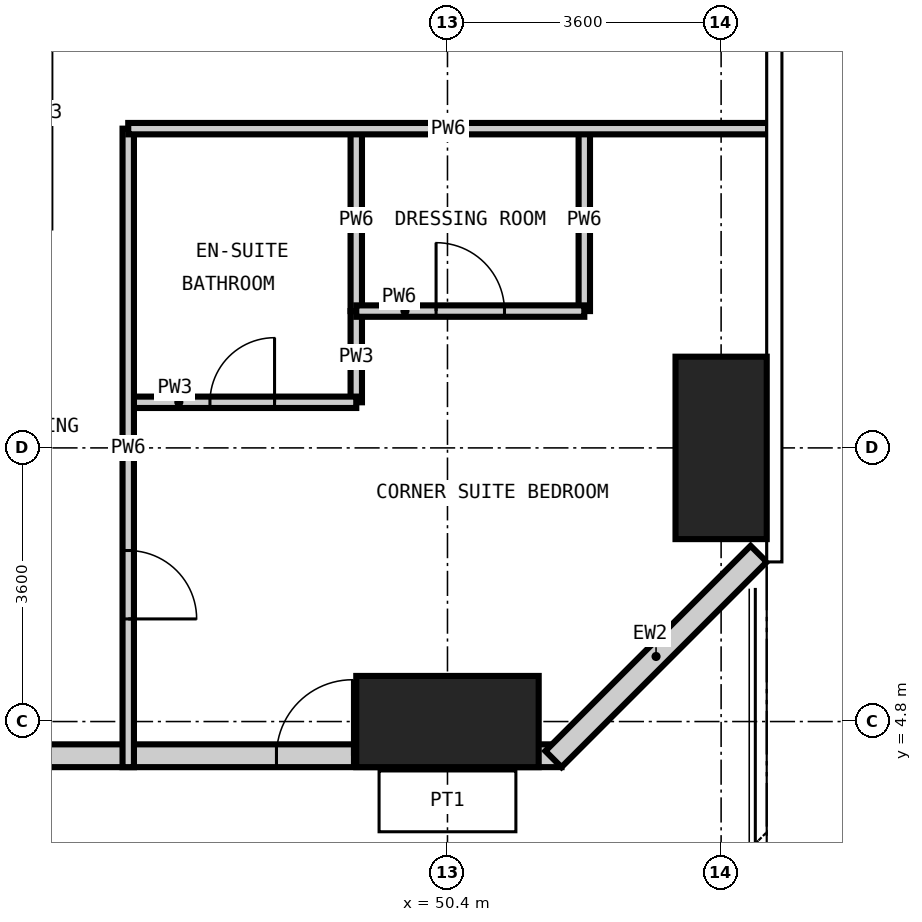
"""IFC4 building model, lengths in metres.
Left out: names, types, materials, properties, quantities, classifications, styles, units other than length and angle.
Written with IfcOpenShell. Run it as: python <this file> out.ifc"""

import sys

from ifc_helpers import new_model, si_unit, direction, frame, frame_2d, origin, origin_2d, place, context, subcontext, project, spatial, rectangle, extrude, element, fill, save


model = new_model("IFC4")
c1 = context("Model", 3, precision=1e-05, world=origin(), true_north=direction((0.0, 1.0)))
c2 = subcontext(c1, "Body", "Model", "MODEL_VIEW")
j1 = project(units=[si_unit("LENGTHUNIT", "METRE"), si_unit("PLANEANGLEUNIT", "RADIAN")], contexts=[c1])
p1 = place(None, origin())
s1 = spatial("IfcSite", under=j1, at=p1, CompositionType="ELEMENT")
p2 = place(p1, origin())
s2 = spatial("IfcBuilding", under=s1, at=p2, CompositionType="ELEMENT")
p3 = place(p2, frame((0.0, 0.0, 159.0)))
s3 = spatial("IfcBuildingStorey", under=s2, at=p3, CompositionType="ELEMENT", Elevation=159.0)
p4 = place(p3, frame((50.4, 4.8, -0.35), z_axis=(0.0, 0.0, 1.0), x_axis=(1.0, 0.0, 0.0)))
e1 = element("IfcColumn", 1, at=p4, inside=s3, PredefinedType="COLUMN", context=c2, shape_type="SweptSolid", body=[
    extrude(rectangle(XDim=2.4, YDim=1.2, at=origin_2d()), origin(), (0.0, 0.0, 1.0), 3.6),
])
p5 = place(p3, frame((54.0, 8.4, -0.35), z_axis=(0.0, 0.0, 1.0), x_axis=(1.0, 0.0, 0.0)))
e2 = element("IfcColumn", 2, at=p5, inside=s3, PredefinedType="COLUMN", context=c2, shape_type="SweptSolid", body=[
    extrude(rectangle(XDim=1.2, YDim=2.4, at=origin_2d()), origin(), (0.0, 0.0, 1.0), 3.6),
])
p6 = place(p3, frame((6.9, 4.35, 0.0), z_axis=(0.0, 0.0, 1.0), x_axis=(1.0, 0.0, 0.0)))
e3 = element("IfcWall", 3, at=p6, inside=s3, PredefinedType="SOLIDWALL", context=c2, shape_type="SweptSolid", body=[
    extrude(rectangle(XDim=45.0, YDim=0.3, at=frame_2d((22.5, 0.0))), origin(), (0.0, 0.0, 1.0), 3.25),
])
p7 = place(p6, frame((2.75, 0.0, 0.0)))
e4 = element("IfcOpeningElement", 4, at=p7, cuts=e3, PredefinedType="OPENING", context=c2, shape_type="SweptSolid", body=[
    extrude(rectangle(XDim=1.0, YDim=2.4, at=frame_2d((0.5, 1.2))), frame((0.0, 0.16, 0.0), z_axis=(0.0, -1.0, 0.0), x_axis=(1.0, 0.0, 0.0)), (0.0, 0.0, 1.0), 0.32),
])
p8 = place(p6, frame((7.3, 0.0, 0.0)))
e5 = element("IfcOpeningElement", 5, at=p8, cuts=e3, PredefinedType="OPENING", context=c2, shape_type="SweptSolid", body=[
    extrude(rectangle(XDim=1.0, YDim=2.4, at=frame_2d((0.5, 1.2))), frame((0.0, 0.16, 0.0), z_axis=(0.0, -1.0, 0.0), x_axis=(1.0, 0.0, 0.0)), (0.0, 0.0, 1.0), 0.32),
])
p9 = place(p6, frame((11.5, 0.0, 0.0)))
e6 = element("IfcOpeningElement", 6, at=p9, cuts=e3, PredefinedType="OPENING", context=c2, shape_type="SweptSolid", body=[
    extrude(rectangle(XDim=1.0, YDim=2.4, at=frame_2d((0.5, 1.2))), frame((0.0, 0.16, 0.0), z_axis=(0.0, -1.0, 0.0), x_axis=(1.0, 0.0, 0.0)), (0.0, 0.0, 1.0), 0.32),
])
p10 = place(p6, frame((15.7, 0.0, 0.0)))
e7 = element("IfcOpeningElement", 7, at=p10, cuts=e3, PredefinedType="OPENING", context=c2, shape_type="SweptSolid", body=[
    extrude(rectangle(XDim=1.0, YDim=2.4, at=frame_2d((0.5, 1.2))), frame((0.0, 0.16, 0.0), z_axis=(0.0, -1.0, 0.0), x_axis=(1.0, 0.0, 0.0)), (0.0, 0.0, 1.0), 0.32),
])
p11 = place(p6, frame((19.9, 0.0, 0.0)))
e8 = element("IfcOpeningElement", 8, at=p11, cuts=e3, PredefinedType="OPENING", context=c2, shape_type="SweptSolid", body=[
    extrude(rectangle(XDim=1.0, YDim=2.4, at=frame_2d((0.5, 1.2))), frame((0.0, 0.16, 0.0), z_axis=(0.0, -1.0, 0.0), x_axis=(1.0, 0.0, 0.0)), (0.0, 0.0, 1.0), 0.32),
])
p12 = place(p6, frame((24.1, 0.0, 0.0)))
e9 = element("IfcOpeningElement", 9, at=p12, cuts=e3, PredefinedType="OPENING", context=c2, shape_type="SweptSolid", body=[
    extrude(rectangle(XDim=1.0, YDim=2.4, at=frame_2d((0.5, 1.2))), frame((0.0, 0.16, 0.0), z_axis=(0.0, -1.0, 0.0), x_axis=(1.0, 0.0, 0.0)), (0.0, 0.0, 1.0), 0.32),
])
p13 = place(p6, frame((28.3, 0.0, 0.0)))
e10 = element("IfcOpeningElement", 10, at=p13, cuts=e3, PredefinedType="OPENING", context=c2, shape_type="SweptSolid", body=[
    extrude(rectangle(XDim=1.0, YDim=2.4, at=frame_2d((0.5, 1.2))), frame((0.0, 0.16, 0.0), z_axis=(0.0, -1.0, 0.0), x_axis=(1.0, 0.0, 0.0)), (0.0, 0.0, 1.0), 0.32),
])
p14 = place(p6, frame((32.5, 0.0, 0.0)))
e11 = element("IfcOpeningElement", 11, at=p14, cuts=e3, PredefinedType="OPENING", context=c2, shape_type="SweptSolid", body=[
    extrude(rectangle(XDim=1.0, YDim=2.4, at=frame_2d((0.5, 1.2))), frame((0.0, 0.16, 0.0), z_axis=(0.0, -1.0, 0.0), x_axis=(1.0, 0.0, 0.0)), (0.0, 0.0, 1.0), 0.32),
])
p15 = place(p6, frame((36.7, 0.0, 0.0)))
e12 = element("IfcOpeningElement", 12, at=p15, cuts=e3, PredefinedType="OPENING", context=c2, shape_type="SweptSolid", body=[
    extrude(rectangle(XDim=1.0, YDim=2.4, at=frame_2d((0.5, 1.2))), frame((0.0, 0.16, 0.0), z_axis=(0.0, -1.0, 0.0), x_axis=(1.0, 0.0, 0.0)), (0.0, 0.0, 1.0), 0.32),
])
p16 = place(p6, frame((41.25, 0.0, 0.0)))
e13 = element("IfcOpeningElement", 13, at=p16, cuts=e3, PredefinedType="OPENING", context=c2, shape_type="SweptSolid", body=[
    extrude(rectangle(XDim=1.0, YDim=2.4, at=frame_2d((0.5, 1.2))), frame((0.0, 0.16, 0.0), z_axis=(0.0, -1.0, 0.0), x_axis=(1.0, 0.0, 0.0)), (0.0, 0.0, 1.0), 0.32),
])
p17 = place(p3, frame((51.794, 4.306, 0.0), z_axis=(0.0, 0.0, 1.0), x_axis=(0.707074812166, 0.707138748762, 0.0)))
e14 = element("IfcWall", 14, at=p17, inside=s3, PredefinedType="SOLIDWALL", context=c2, shape_type="SweptSolid", body=[
    extrude(rectangle(XDim=3.818, YDim=0.3, at=frame_2d((1.909, 0.0))), origin(), (0.0, 0.0, 1.0), 3.25),
])
p18 = place(p3, frame((49.2, 9.0, 0.0), z_axis=(0.0, 0.0, 1.0), x_axis=(0.0, 1.0, 0.0)))
e15 = element("IfcWall", 15, at=p18, inside=s3, PredefinedType="PARTITIONING", context=c2, shape_type="SweptSolid", body=[
    extrude(rectangle(XDim=1.2, YDim=0.15, at=frame_2d((0.6, 0.0))), origin(), (0.0, 0.0, 1.0), 3.25),
])
p19 = place(p3, frame((46.2, 9.0, 0.0), z_axis=(0.0, 0.0, 1.0), x_axis=(1.0, 0.0, 0.0)))
e16 = element("IfcWall", 16, at=p19, inside=s3, PredefinedType="PARTITIONING", context=c2, shape_type="SweptSolid", body=[
    extrude(rectangle(XDim=3.0, YDim=0.15, at=frame_2d((1.5, 0.0))), origin(), (0.0, 0.0, 1.0), 3.25),
])
p20 = place(p19, frame((1.075, 0.0, 0.0)))
e17 = element("IfcOpeningElement", 17, at=p20, cuts=e16, PredefinedType="OPENING", context=c2, shape_type="SweptSolid", body=[
    extrude(rectangle(XDim=0.85, YDim=2.1, at=frame_2d((0.425, 1.05))), frame((0.0, 0.085, 0.0), z_axis=(0.0, -1.0, 0.0), x_axis=(1.0, 0.0, 0.0)), (0.0, 0.0, 1.0), 0.17),
])
p21 = place(p3, frame((46.2, 4.2, 0.0), z_axis=(0.0, 0.0, 1.0), x_axis=(0.0, 1.0, 0.0)))
e18 = element("IfcWall", 18, at=p21, inside=s3, PredefinedType="PARTITIONING", context=c2, shape_type="SweptSolid", body=[
    extrude(rectangle(XDim=8.4, YDim=0.15, at=frame_2d((4.2, 0.0))), origin(), (0.0, 0.0, 1.0), 3.25),
])
p22 = place(p21, frame((1.95, 0.0, 0.0)))
e19 = element("IfcOpeningElement", 19, at=p22, cuts=e18, PredefinedType="OPENING", context=c2, shape_type="SweptSolid", body=[
    extrude(rectangle(XDim=0.9, YDim=2.1, at=frame_2d((0.45, 1.05))), frame((0.0, 0.085, 0.0), z_axis=(0.0, -1.0, 0.0), x_axis=(1.0, 0.0, 0.0)), (0.0, 0.0, 1.0), 0.17),
])
for number, where, z_axis, x_axis in (
    (20, (49.2, 10.2, 0.0), (0.0, 0.0, 1.0), (0.0, 1.0, 0.0)),
    (21, (52.2, 10.2, 0.0), (0.0, 0.0, 1.0), (0.0, 1.0, 0.0)),
):
    element("IfcWall", number, at=place(p3, frame(where, z_axis=z_axis, x_axis=x_axis)), inside=s3, PredefinedType="PARTITIONING", context=c2, shape_type="SweptSolid", body=[
        extrude(rectangle(XDim=2.4, YDim=0.15, at=frame_2d((1.2, 0.0))), origin(), (0.0, 0.0, 1.0), 3.25),
    ])
p23 = place(p3, frame((49.2, 10.2, 0.0), z_axis=(0.0, 0.0, 1.0), x_axis=(1.0, 0.0, 0.0)))
e22 = element("IfcWall", 22, at=p23, inside=s3, PredefinedType="PARTITIONING", context=c2, shape_type="SweptSolid", body=[
    extrude(rectangle(XDim=3.0, YDim=0.15, at=frame_2d((1.5, 0.0))), origin(), (0.0, 0.0, 1.0), 3.25),
])
p24 = place(p23, frame((1.05, 0.0, 0.0)))
e23 = element("IfcOpeningElement", 23, at=p24, cuts=e22, PredefinedType="OPENING", context=c2, shape_type="SweptSolid", body=[
    extrude(rectangle(XDim=0.9, YDim=2.1, at=frame_2d((0.45, 1.05))), frame((0.0, 0.085, 0.0), z_axis=(0.0, -1.0, 0.0), x_axis=(1.0, 0.0, 0.0)), (0.0, 0.0, 1.0), 0.17),
])
p25 = place(p3, frame((46.2, 12.6, 0.0), z_axis=(0.0, 0.0, 1.0), x_axis=(1.0, 0.0, 0.0)))
e24 = element("IfcWall", 24, at=p25, inside=s3, PredefinedType="PARTITIONING", context=c2, shape_type="SweptSolid", body=[
    extrude(rectangle(XDim=8.418, YDim=0.15, at=frame_2d((4.209, 0.0))), origin(), (0.0, 0.0, 1.0), 3.25),
])
p26 = place(p16, origin())
e25 = element("IfcDoor", 25, at=p26, inside=s3, OperationType="SINGLE_SWING_RIGHT", PredefinedType="DOOR", context=c2, shape_type="SweptSolid", body=[
    extrude(rectangle(XDim=1.0, YDim=2.4, at=frame_2d((0.5, 1.2))), frame((0.0, 0.025, 0.0), z_axis=(0.0, -1.0, 0.0), x_axis=(1.0, 0.0, 0.0)), (0.0, 0.0, 1.0), 0.05),
])
fill(e13, e25)
p27 = place(p22, frame((0.9, 0.0, 0.0), z_axis=(0.0, 0.0, 1.0), x_axis=(-1.0, 0.0, 0.0)))
e26 = element("IfcDoor", 26, at=p27, inside=s3, OperationType="SINGLE_SWING_RIGHT", PredefinedType="DOOR", context=c2, shape_type="SweptSolid", body=[
    extrude(rectangle(XDim=0.9, YDim=2.1, at=frame_2d((0.45, 1.05))), frame((0.0, 0.025, 0.0), z_axis=(0.0, -1.0, 0.0), x_axis=(1.0, 0.0, 0.0)), (0.0, 0.0, 1.0), 0.05),
])
fill(e19, e26)
p28 = place(p20, origin())
e27 = element("IfcDoor", 27, at=p28, inside=s3, OperationType="SINGLE_SWING_RIGHT", PredefinedType="DOOR", context=c2, shape_type="SweptSolid", body=[
    extrude(rectangle(XDim=0.85, YDim=2.1, at=frame_2d((0.425, 1.05))), frame((0.0, 0.025, 0.0), z_axis=(0.0, -1.0, 0.0), x_axis=(1.0, 0.0, 0.0)), (0.0, 0.0, 1.0), 0.05),
])
fill(e17, e27)
p29 = place(p24, origin())
e28 = element("IfcDoor", 28, at=p29, inside=s3, OperationType="SINGLE_SWING_LEFT", PredefinedType="DOOR", context=c2, shape_type="SweptSolid", body=[
    extrude(rectangle(XDim=0.9, YDim=2.1, at=frame_2d((0.45, 1.05))), frame((0.0, 0.025, 0.0), z_axis=(0.0, -1.0, 0.0), x_axis=(1.0, 0.0, 0.0)), (0.0, 0.0, 1.0), 0.05),
])
fill(e23, e28)
save(model, sys.argv[1])
